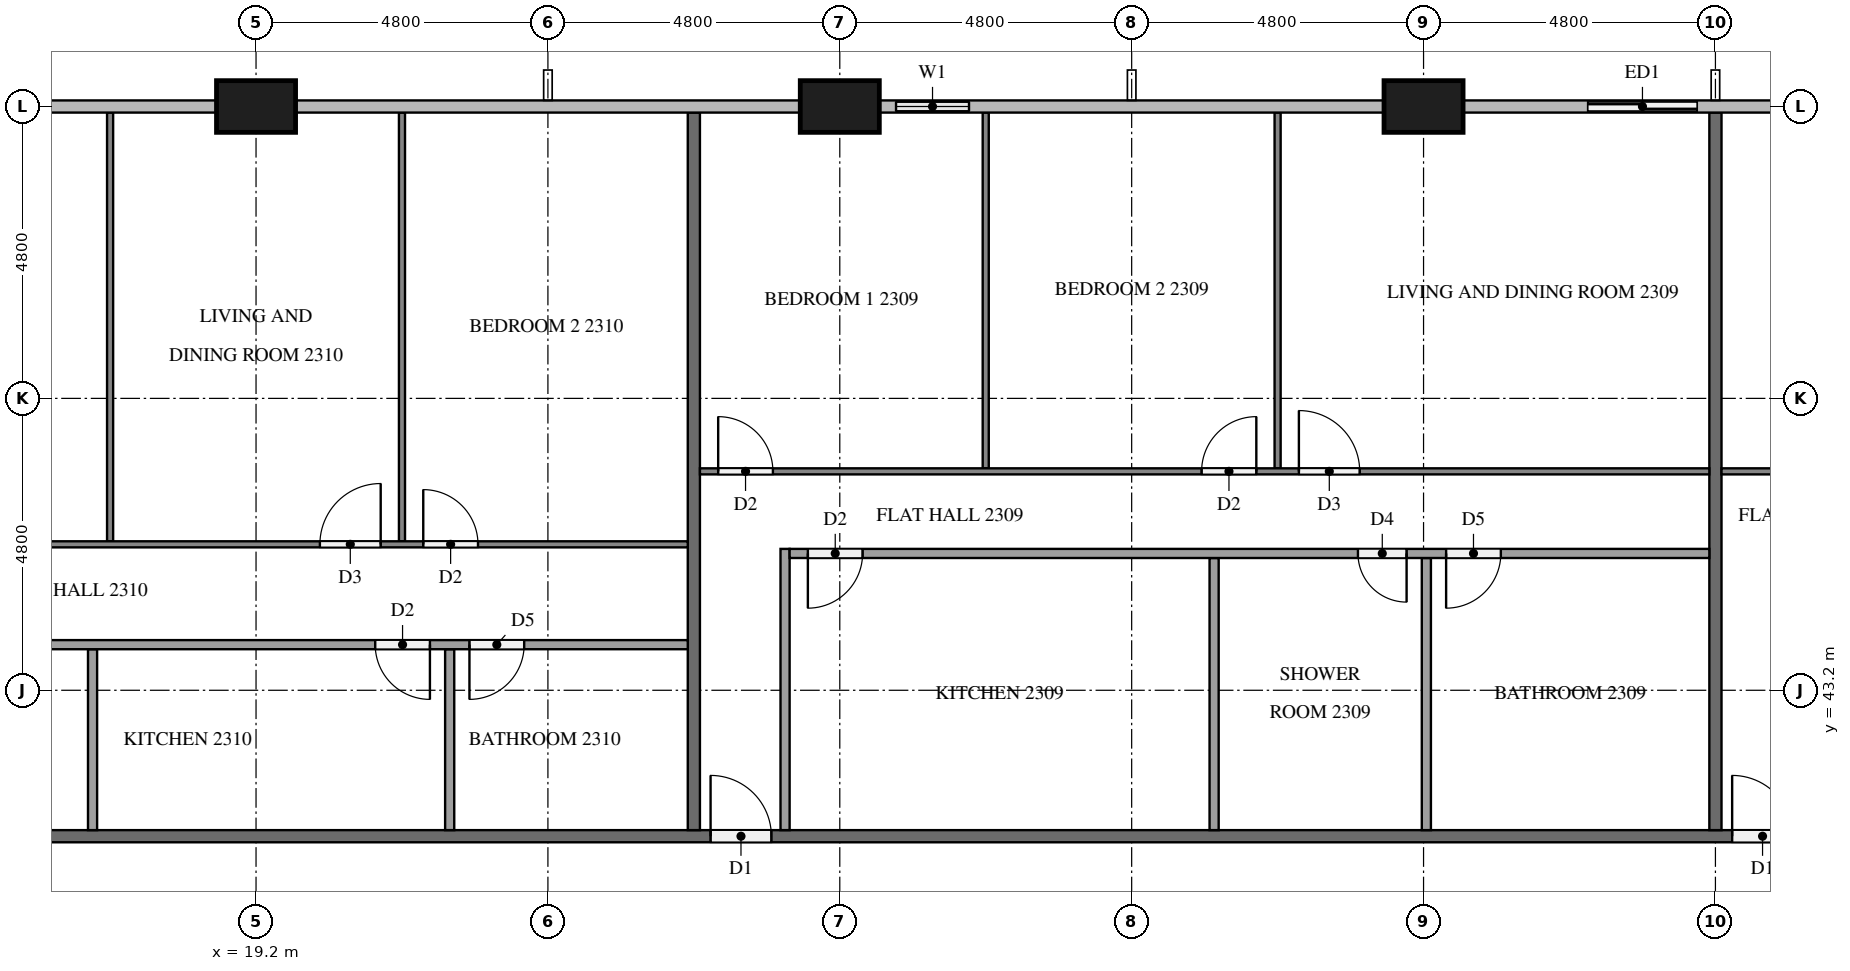
"""IFC4 building model, lengths in metres.
Left out: names, types, materials, properties, quantities, classifications, styles, units other than length and angle.
Written with IfcOpenShell. Run it as: python <this file> out.ifc"""

import sys

from ifc_helpers import new_model, si_unit, direction, frame, frame_2d, origin, origin_2d, place, context, subcontext, project, spatial, rectangle, extrude, element, fill, save


model = new_model("IFC4")
c1 = context("Model", 3, precision=1e-05, world=origin(), true_north=direction((0.0, 1.0)))
c2 = subcontext(c1, "Body", "Model", "MODEL_VIEW")
j1 = project(units=[si_unit("LENGTHUNIT", "METRE"), si_unit("PLANEANGLEUNIT", "RADIAN")], contexts=[c1])
p1 = place(None, origin())
s1 = spatial("IfcSite", under=j1, at=p1, CompositionType="ELEMENT")
p2 = place(p1, origin())
s2 = spatial("IfcBuilding", under=s1, at=p2, CompositionType="ELEMENT")
p3 = place(p2, frame((0.0, 0.0, 92.7)))
s3 = spatial("IfcBuildingStorey", under=s2, at=p3, CompositionType="ELEMENT", Elevation=92.7)
for number, where, z_axis, x_axis in (
    (1, (38.4, 52.8, 0.0), (0.0, 0.0, 1.0), (1.0, 0.0, 0.0)),
    (2, (28.8, 52.8, 0.0), (0.0, 0.0, 1.0), (1.0, 0.0, 0.0)),
    (3, (19.2, 52.8, 0.0), (0.0, 0.0, 1.0), (1.0, 0.0, 0.0)),
):
    element("IfcColumn", number, at=place(p3, frame(where, z_axis=z_axis, x_axis=x_axis)), inside=s3, PredefinedType="COLUMN", context=c2, shape_type="SweptSolid", body=[
        extrude(rectangle(XDim=1.3, YDim=0.85, at=origin_2d()), origin(), (0.0, 0.0, 1.0), 3.2),
    ])
p4 = place(p3, frame((43.2, 52.8, 0.0), z_axis=(0.0, 0.0, 1.0), x_axis=(-1.0, 0.0, 0.0)))
e4 = element("IfcWall", 4, at=p4, inside=s3, PredefinedType="SOLIDWALL", context=c2, shape_type="SweptSolid", body=[
    extrude(rectangle(XDim=2.4, YDim=0.15, at=frame_2d((1.2, 0.0))), origin(), (0.0, 0.0, 1.0), 3.2),
])
p5 = place(p4, frame((0.3, 0.0, 0.0)))
e5 = element("IfcOpeningElement", 5, at=p5, cuts=e4, PredefinedType="OPENING", context=c2, shape_type="SweptSolid", body=[
    extrude(rectangle(XDim=1.8, YDim=2.4, at=frame_2d((0.9, 1.2))), frame((0.0, 0.085, 0.0), z_axis=(0.0, -1.0, 0.0), x_axis=(1.0, 0.0, 0.0)), (0.0, 0.0, 1.0), 0.17),
])
p6 = place(p3, frame((31.2, 52.8, 0.0), z_axis=(0.0, 0.0, 1.0), x_axis=(-1.0, 0.0, 0.0)))
e6 = element("IfcWall", 6, at=p6, inside=s3, PredefinedType="SOLIDWALL", context=c2, shape_type="SweptSolid", body=[
    extrude(rectangle(XDim=1.75, YDim=0.15, at=frame_2d((0.875, 0.0))), origin(), (0.0, 0.0, 1.0), 3.2),
])
p7 = place(p6, frame((0.275, 0.0, 0.9)))
e7 = element("IfcOpeningElement", 7, at=p7, cuts=e6, PredefinedType="OPENING", context=c2, shape_type="SweptSolid", body=[
    extrude(rectangle(XDim=1.2, YDim=1.4, at=frame_2d((0.6, 0.7))), frame((0.0, 0.085, 0.0), z_axis=(0.0, -1.0, 0.0), x_axis=(1.0, 0.0, 0.0)), (0.0, 0.0, 1.0), 0.17),
])
p8 = place(p3, frame((11.9, 40.8, 0.0), z_axis=(0.0, 0.0, 1.0), x_axis=(1.0, 0.0, 0.0)))
e8 = element("IfcWall", 8, at=p8, inside=s3, PredefinedType="PARTITIONING", context=c2, shape_type="SweptSolid", body=[
    extrude(rectangle(XDim=38.6, YDim=0.2, at=frame_2d((19.3, 0.0))), origin(), (0.0, 0.0, 1.0), 3.2),
])
p9 = place(p8, frame((31.575, 0.0, 0.0)))
e9 = element("IfcOpeningElement", 9, at=p9, cuts=e8, PredefinedType="OPENING", context=c2, shape_type="SweptSolid", body=[
    extrude(rectangle(XDim=1.0, YDim=2.1, at=frame_2d((0.5, 1.05))), frame((0.0, 0.11, 0.0), z_axis=(0.0, -1.0, 0.0), x_axis=(1.0, 0.0, 0.0)), (0.0, 0.0, 1.0), 0.22),
])
p10 = place(p8, frame((14.775, 0.0, 0.0)))
e10 = element("IfcOpeningElement", 10, at=p10, cuts=e8, PredefinedType="OPENING", context=c2, shape_type="SweptSolid", body=[
    extrude(rectangle(XDim=1.0, YDim=2.1, at=frame_2d((0.5, 1.05))), frame((0.0, 0.11, 0.0), z_axis=(0.0, -1.0, 0.0), x_axis=(1.0, 0.0, 0.0)), (0.0, 0.0, 1.0), 0.22),
])
p11 = place(p8, frame((0.375, 0.0, 0.0)))
e11 = element("IfcOpeningElement", 11, at=p11, cuts=e8, PredefinedType="OPENING", context=c2, shape_type="SweptSolid", body=[
    extrude(rectangle(XDim=1.0, YDim=2.1, at=frame_2d((0.5, 1.05))), frame((0.0, 0.11, 0.0), z_axis=(0.0, -1.0, 0.0), x_axis=(1.0, 0.0, 0.0)), (0.0, 0.0, 1.0), 0.22),
])
for number, where, z_axis, x_axis in (
    (12, (43.2, 52.7, 0.0), (0.0, 0.0, 1.0), (0.0, -1.0, 0.0)),
    (13, (26.4, 52.7, 0.0), (0.0, 0.0, 1.0), (0.0, -1.0, 0.0)),
):
    element("IfcWall", number, at=place(p3, frame(where, z_axis=z_axis, x_axis=x_axis)), inside=s3, PredefinedType="PARTITIONING", context=c2, shape_type="SweptSolid", body=[
        extrude(rectangle(XDim=11.8, YDim=0.2, at=frame_2d((5.9, 0.0))), origin(), (0.0, 0.0, 1.0), 3.2),
    ])
p12 = place(p3, frame((43.3, 46.8, 0.0), z_axis=(0.0, 0.0, 1.0), x_axis=(1.0, 0.0, 0.0)))
e14 = element("IfcWall", 14, at=p12, inside=s3, PredefinedType="PARTITIONING", context=c2, shape_type="SweptSolid", body=[
    extrude(rectangle(XDim=7.0, YDim=0.1, at=frame_2d((3.5, 0.0))), origin(), (0.0, 0.0, 1.0), 3.2),
])
p13 = place(p12, frame((5.7, 0.0, 0.0)))
e15 = element("IfcOpeningElement", 15, at=p13, cuts=e14, PredefinedType="OPENING", context=c2, shape_type="SweptSolid", body=[
    extrude(rectangle(XDim=1.0, YDim=2.1, at=frame_2d((0.5, 1.05))), frame((0.0, 0.06, 0.0), z_axis=(0.0, -1.0, 0.0), x_axis=(1.0, 0.0, 0.0)), (0.0, 0.0, 1.0), 0.12),
])
for number, where, z_axis, x_axis in (
    (16, (31.2, 46.85, 0.0), (0.0, 0.0, 1.0), (0.0, 1.0, 0.0)),
    (17, (36.0, 46.85, 0.0), (0.0, 0.0, 1.0), (0.0, 1.0, 0.0)),
):
    element("IfcWall", number, at=place(p3, frame(where, z_axis=z_axis, x_axis=x_axis)), inside=s3, PredefinedType="PARTITIONING", context=c2, shape_type="SweptSolid", body=[
        extrude(rectangle(XDim=5.85, YDim=0.1, at=frame_2d((2.925, 0.0))), origin(), (0.0, 0.0, 1.0), 3.2),
    ])
p14 = place(p3, frame((26.5, 46.8, 0.0), z_axis=(0.0, 0.0, 1.0), x_axis=(1.0, 0.0, 0.0)))
e18 = element("IfcWall", 18, at=p14, inside=s3, PredefinedType="PARTITIONING", context=c2, shape_type="SweptSolid", body=[
    extrude(rectangle(XDim=16.6, YDim=0.1, at=frame_2d((8.3, 0.0))), origin(), (0.0, 0.0, 1.0), 3.2),
])
p15 = place(p14, frame((0.3, 0.0, 0.0)))
e19 = element("IfcOpeningElement", 19, at=p15, cuts=e18, PredefinedType="OPENING", context=c2, shape_type="SweptSolid", body=[
    extrude(rectangle(XDim=0.9, YDim=2.1, at=frame_2d((0.45, 1.05))), frame((0.0, 0.06, 0.0), z_axis=(0.0, -1.0, 0.0), x_axis=(1.0, 0.0, 0.0)), (0.0, 0.0, 1.0), 0.12),
])
p16 = place(p14, frame((8.25, 0.0, 0.0)))
e20 = element("IfcOpeningElement", 20, at=p16, cuts=e18, PredefinedType="OPENING", context=c2, shape_type="SweptSolid", body=[
    extrude(rectangle(XDim=0.9, YDim=2.1, at=frame_2d((0.45, 1.05))), frame((0.0, 0.06, 0.0), z_axis=(0.0, -1.0, 0.0), x_axis=(1.0, 0.0, 0.0)), (0.0, 0.0, 1.0), 0.12),
])
p17 = place(p14, frame((9.85, 0.0, 0.0)))
e21 = element("IfcOpeningElement", 21, at=p17, cuts=e18, PredefinedType="OPENING", context=c2, shape_type="SweptSolid", body=[
    extrude(rectangle(XDim=1.0, YDim=2.1, at=frame_2d((0.5, 1.05))), frame((0.0, 0.06, 0.0), z_axis=(0.0, -1.0, 0.0), x_axis=(1.0, 0.0, 0.0)), (0.0, 0.0, 1.0), 0.12),
])
for number, where, z_axis, x_axis in (
    (22, (34.956, 40.9, 0.0), (0.0, 0.0, 1.0), (0.0, 1.0, 0.0)),
    (23, (38.446, 40.9, 0.0), (0.0, 0.0, 1.0), (0.0, 1.0, 0.0)),
):
    element("IfcWall", number, at=place(p3, frame(where, z_axis=z_axis, x_axis=x_axis)), inside=s3, PredefinedType="PARTITIONING", context=c2, shape_type="SweptSolid", body=[
        extrude(rectangle(XDim=4.475, YDim=0.15, at=frame_2d((2.238, 0.0))), origin(), (0.0, 0.0, 1.0), 3.2),
    ])
p18 = place(p3, frame((27.9, 40.9, 0.0), z_axis=(0.0, 0.0, 1.0), x_axis=(0.0, 1.0, 0.0)))
e24 = element("IfcWall", 24, at=p18, inside=s3, PredefinedType="PARTITIONING", context=c2, shape_type="SweptSolid", body=[
    extrude(rectangle(XDim=4.625, YDim=0.15, at=frame_2d((2.312, 0.0))), origin(), (0.0, 0.0, 1.0), 3.2),
])
p19 = place(p3, frame((43.1, 45.45, 0.0), z_axis=(0.0, 0.0, 1.0), x_axis=(-1.0, 0.0, 0.0)))
e25 = element("IfcWall", 25, at=p19, inside=s3, PredefinedType="PARTITIONING", context=c2, shape_type="SweptSolid", body=[
    extrude(rectangle(XDim=15.125, YDim=0.15, at=frame_2d((7.562, 0.0))), origin(), (0.0, 0.0, 1.0), 3.2),
])
p20 = place(p19, frame((13.925, 0.0, 0.0)))
e26 = element("IfcOpeningElement", 26, at=p20, cuts=e25, PredefinedType="OPENING", context=c2, shape_type="SweptSolid", body=[
    extrude(rectangle(XDim=0.9, YDim=2.1, at=frame_2d((0.45, 1.05))), frame((0.0, 0.085, 0.0), z_axis=(0.0, -1.0, 0.0), x_axis=(1.0, 0.0, 0.0)), (0.0, 0.0, 1.0), 0.17),
])
p21 = place(p19, frame((4.979, 0.0, 0.0)))
e27 = element("IfcOpeningElement", 27, at=p21, cuts=e25, PredefinedType="OPENING", context=c2, shape_type="SweptSolid", body=[
    extrude(rectangle(XDim=0.8, YDim=2.1, at=frame_2d((0.4, 1.05))), frame((0.0, 0.085, 0.0), z_axis=(0.0, -1.0, 0.0), x_axis=(1.0, 0.0, 0.0)), (0.0, 0.0, 1.0), 0.17),
])
p22 = place(p19, frame((3.429, 0.0, 0.0)))
e28 = element("IfcOpeningElement", 28, at=p22, cuts=e25, PredefinedType="OPENING", context=c2, shape_type="SweptSolid", body=[
    extrude(rectangle(XDim=0.9, YDim=2.1, at=frame_2d((0.45, 1.05))), frame((0.0, 0.085, 0.0), z_axis=(0.0, -1.0, 0.0), x_axis=(1.0, 0.0, 0.0)), (0.0, 0.0, 1.0), 0.17),
])
for number, where, z_axis, x_axis in (
    (29, (16.8, 45.65, 0.0), (0.0, 0.0, 1.0), (0.0, 1.0, 0.0)),
    (30, (21.6, 45.65, 0.0), (0.0, 0.0, 1.0), (0.0, 1.0, 0.0)),
):
    element("IfcWall", number, at=place(p3, frame(where, z_axis=z_axis, x_axis=x_axis)), inside=s3, PredefinedType="PARTITIONING", context=c2, shape_type="SweptSolid", body=[
        extrude(rectangle(XDim=7.05, YDim=0.1, at=frame_2d((3.525, 0.0))), origin(), (0.0, 0.0, 1.0), 3.2),
    ])
p23 = place(p3, frame((12.1, 45.6, 0.0), z_axis=(0.0, 0.0, 1.0), x_axis=(1.0, 0.0, 0.0)))
e31 = element("IfcWall", 31, at=p23, inside=s3, PredefinedType="PARTITIONING", context=c2, shape_type="SweptSolid", body=[
    extrude(rectangle(XDim=14.2, YDim=0.1, at=frame_2d((7.1, 0.0))), origin(), (0.0, 0.0, 1.0), 3.2),
])
p24 = place(p23, frame((0.3, 0.0, 0.0)))
e32 = element("IfcOpeningElement", 32, at=p24, cuts=e31, PredefinedType="OPENING", context=c2, shape_type="SweptSolid", body=[
    extrude(rectangle(XDim=0.9, YDim=2.1, at=frame_2d((0.45, 1.05))), frame((0.0, 0.06, 0.0), z_axis=(0.0, -1.0, 0.0), x_axis=(1.0, 0.0, 0.0)), (0.0, 0.0, 1.0), 0.12),
])
p25 = place(p23, frame((8.15, 0.0, 0.0)))
e33 = element("IfcOpeningElement", 33, at=p25, cuts=e31, PredefinedType="OPENING", context=c2, shape_type="SweptSolid", body=[
    extrude(rectangle(XDim=1.0, YDim=2.1, at=frame_2d((0.5, 1.05))), frame((0.0, 0.06, 0.0), z_axis=(0.0, -1.0, 0.0), x_axis=(1.0, 0.0, 0.0)), (0.0, 0.0, 1.0), 0.12),
])
p26 = place(p23, frame((9.85, 0.0, 0.0)))
e34 = element("IfcOpeningElement", 34, at=p26, cuts=e31, PredefinedType="OPENING", context=c2, shape_type="SweptSolid", body=[
    extrude(rectangle(XDim=0.9, YDim=2.1, at=frame_2d((0.45, 1.05))), frame((0.0, 0.06, 0.0), z_axis=(0.0, -1.0, 0.0), x_axis=(1.0, 0.0, 0.0)), (0.0, 0.0, 1.0), 0.12),
])
for number, where, z_axis, x_axis in (
    (35, (16.511, 40.9, 0.0), (0.0, 0.0, 1.0), (0.0, 1.0, 0.0)),
    (36, (22.385, 40.9, 0.0), (0.0, 0.0, 1.0), (0.0, 1.0, 0.0)),
):
    element("IfcWall", number, at=place(p3, frame(where, z_axis=z_axis, x_axis=x_axis)), inside=s3, PredefinedType="PARTITIONING", context=c2, shape_type="SweptSolid", body=[
        extrude(rectangle(XDim=2.975, YDim=0.15, at=frame_2d((1.488, 0.0))), origin(), (0.0, 0.0, 1.0), 3.2),
    ])
p27 = place(p3, frame((26.3, 43.95, 0.0), z_axis=(0.0, 0.0, 1.0), x_axis=(-1.0, 0.0, 0.0)))
e37 = element("IfcWall", 37, at=p27, inside=s3, PredefinedType="PARTITIONING", context=c2, shape_type="SweptSolid", body=[
    extrude(rectangle(XDim=12.725, YDim=0.15, at=frame_2d((6.363, 0.0))), origin(), (0.0, 0.0, 1.0), 3.2),
])
p28 = place(p27, frame((11.625, 0.0, 0.0)))
e38 = element("IfcOpeningElement", 38, at=p28, cuts=e37, PredefinedType="OPENING", context=c2, shape_type="SweptSolid", body=[
    extrude(rectangle(XDim=0.8, YDim=2.1, at=frame_2d((0.4, 1.05))), frame((0.0, 0.085, 0.0), z_axis=(0.0, -1.0, 0.0), x_axis=(1.0, 0.0, 0.0)), (0.0, 0.0, 1.0), 0.17),
])
p29 = place(p27, frame((4.24, 0.0, 0.0)))
e39 = element("IfcOpeningElement", 39, at=p29, cuts=e37, PredefinedType="OPENING", context=c2, shape_type="SweptSolid", body=[
    extrude(rectangle(XDim=0.9, YDim=2.1, at=frame_2d((0.45, 1.05))), frame((0.0, 0.085, 0.0), z_axis=(0.0, -1.0, 0.0), x_axis=(1.0, 0.0, 0.0)), (0.0, 0.0, 1.0), 0.17),
])
p30 = place(p27, frame((2.69, 0.0, 0.0)))
e40 = element("IfcOpeningElement", 40, at=p30, cuts=e37, PredefinedType="OPENING", context=c2, shape_type="SweptSolid", body=[
    extrude(rectangle(XDim=0.9, YDim=2.1, at=frame_2d((0.45, 1.05))), frame((0.0, 0.085, 0.0), z_axis=(0.0, -1.0, 0.0), x_axis=(1.0, 0.0, 0.0)), (0.0, 0.0, 1.0), 0.17),
])
p31 = place(p5, origin())
e41 = element("IfcDoor", 41, at=p31, inside=s3, OperationType="SLIDING_TO_RIGHT", PredefinedType="DOOR", context=c2, shape_type="SweptSolid", body=[
    extrude(rectangle(XDim=1.8, YDim=2.4, at=frame_2d((0.9, 1.2))), frame((0.0, 0.025, 0.0), z_axis=(0.0, -1.0, 0.0), x_axis=(1.0, 0.0, 0.0)), (0.0, 0.0, 1.0), 0.05),
])
fill(e5, e41)
p32 = place(p7, origin())
e42 = element("IfcWindow", 42, at=p32, inside=s3, PartitioningType="SINGLE_PANEL", PredefinedType="WINDOW", context=c2, shape_type="SweptSolid", body=[
    extrude(rectangle(XDim=1.2, YDim=1.4, at=frame_2d((0.6, 0.7))), frame((0.0, 0.03, 0.0), z_axis=(0.0, -1.0, 0.0), x_axis=(1.0, 0.0, 0.0)), (0.0, 0.0, 1.0), 0.06),
])
fill(e7, e42)
p33 = place(p9, origin())
e43 = element("IfcDoor", 43, at=p33, inside=s3, OperationType="SINGLE_SWING_LEFT", PredefinedType="DOOR", context=c2, shape_type="SweptSolid", body=[
    extrude(rectangle(XDim=1.0, YDim=2.1, at=frame_2d((0.5, 1.05))), frame((0.0, 0.025, 0.0), z_axis=(0.0, -1.0, 0.0), x_axis=(1.0, 0.0, 0.0)), (0.0, 0.0, 1.0), 0.05),
])
fill(e9, e43)
p34 = place(p10, origin())
e44 = element("IfcDoor", 44, at=p34, inside=s3, OperationType="SINGLE_SWING_LEFT", PredefinedType="DOOR", context=c2, shape_type="SweptSolid", body=[
    extrude(rectangle(XDim=1.0, YDim=2.1, at=frame_2d((0.5, 1.05))), frame((0.0, 0.025, 0.0), z_axis=(0.0, -1.0, 0.0), x_axis=(1.0, 0.0, 0.0)), (0.0, 0.0, 1.0), 0.05),
])
fill(e10, e44)
p35 = place(p15, origin())
e45 = element("IfcDoor", 45, at=p35, inside=s3, OperationType="SINGLE_SWING_LEFT", PredefinedType="DOOR", context=c2, shape_type="SweptSolid", body=[
    extrude(rectangle(XDim=0.9, YDim=2.1, at=frame_2d((0.45, 1.05))), frame((0.0, 0.025, 0.0), z_axis=(0.0, -1.0, 0.0), x_axis=(1.0, 0.0, 0.0)), (0.0, 0.0, 1.0), 0.05),
])
fill(e19, e45)
p36 = place(p16, origin())
e46 = element("IfcDoor", 46, at=p36, inside=s3, OperationType="SINGLE_SWING_RIGHT", PredefinedType="DOOR", context=c2, shape_type="SweptSolid", body=[
    extrude(rectangle(XDim=0.9, YDim=2.1, at=frame_2d((0.45, 1.05))), frame((0.0, 0.025, 0.0), z_axis=(0.0, -1.0, 0.0), x_axis=(1.0, 0.0, 0.0)), (0.0, 0.0, 1.0), 0.05),
])
fill(e20, e46)
p37 = place(p17, origin())
e47 = element("IfcDoor", 47, at=p37, inside=s3, OperationType="SINGLE_SWING_LEFT", PredefinedType="DOOR", context=c2, shape_type="SweptSolid", body=[
    extrude(rectangle(XDim=1.0, YDim=2.1, at=frame_2d((0.5, 1.05))), frame((0.0, 0.025, 0.0), z_axis=(0.0, -1.0, 0.0), x_axis=(1.0, 0.0, 0.0)), (0.0, 0.0, 1.0), 0.05),
])
fill(e21, e47)
p38 = place(p20, origin())
e48 = element("IfcDoor", 48, at=p38, inside=s3, OperationType="SINGLE_SWING_RIGHT", PredefinedType="DOOR", context=c2, shape_type="SweptSolid", body=[
    extrude(rectangle(XDim=0.9, YDim=2.1, at=frame_2d((0.45, 1.05))), frame((0.0, 0.025, 0.0), z_axis=(0.0, -1.0, 0.0), x_axis=(1.0, 0.0, 0.0)), (0.0, 0.0, 1.0), 0.05),
])
fill(e26, e48)
p39 = place(p21, origin())
e49 = element("IfcDoor", 49, at=p39, inside=s3, OperationType="SINGLE_SWING_LEFT", PredefinedType="DOOR", context=c2, shape_type="SweptSolid", body=[
    extrude(rectangle(XDim=0.8, YDim=2.1, at=frame_2d((0.4, 1.05))), frame((0.0, 0.025, 0.0), z_axis=(0.0, -1.0, 0.0), x_axis=(1.0, 0.0, 0.0)), (0.0, 0.0, 1.0), 0.05),
])
fill(e27, e49)
p40 = place(p22, origin())
e50 = element("IfcDoor", 50, at=p40, inside=s3, OperationType="SINGLE_SWING_RIGHT", PredefinedType="DOOR", context=c2, shape_type="SweptSolid", body=[
    extrude(rectangle(XDim=0.9, YDim=2.1, at=frame_2d((0.45, 1.05))), frame((0.0, 0.025, 0.0), z_axis=(0.0, -1.0, 0.0), x_axis=(1.0, 0.0, 0.0)), (0.0, 0.0, 1.0), 0.05),
])
fill(e28, e50)
p41 = place(p25, origin())
e51 = element("IfcDoor", 51, at=p41, inside=s3, OperationType="SINGLE_SWING_RIGHT", PredefinedType="DOOR", context=c2, shape_type="SweptSolid", body=[
    extrude(rectangle(XDim=1.0, YDim=2.1, at=frame_2d((0.5, 1.05))), frame((0.0, 0.025, 0.0), z_axis=(0.0, -1.0, 0.0), x_axis=(1.0, 0.0, 0.0)), (0.0, 0.0, 1.0), 0.05),
])
fill(e33, e51)
p42 = place(p26, origin())
e52 = element("IfcDoor", 52, at=p42, inside=s3, OperationType="SINGLE_SWING_LEFT", PredefinedType="DOOR", context=c2, shape_type="SweptSolid", body=[
    extrude(rectangle(XDim=0.9, YDim=2.1, at=frame_2d((0.45, 1.05))), frame((0.0, 0.025, 0.0), z_axis=(0.0, -1.0, 0.0), x_axis=(1.0, 0.0, 0.0)), (0.0, 0.0, 1.0), 0.05),
])
fill(e34, e52)
p43 = place(p29, origin())
e53 = element("IfcDoor", 53, at=p43, inside=s3, OperationType="SINGLE_SWING_LEFT", PredefinedType="DOOR", context=c2, shape_type="SweptSolid", body=[
    extrude(rectangle(XDim=0.9, YDim=2.1, at=frame_2d((0.45, 1.05))), frame((0.0, 0.025, 0.0), z_axis=(0.0, -1.0, 0.0), x_axis=(1.0, 0.0, 0.0)), (0.0, 0.0, 1.0), 0.05),
])
fill(e39, e53)
p44 = place(p30, origin())
e54 = element("IfcDoor", 54, at=p44, inside=s3, OperationType="SINGLE_SWING_RIGHT", PredefinedType="DOOR", context=c2, shape_type="SweptSolid", body=[
    extrude(rectangle(XDim=0.9, YDim=2.1, at=frame_2d((0.45, 1.05))), frame((0.0, 0.025, 0.0), z_axis=(0.0, -1.0, 0.0), x_axis=(1.0, 0.0, 0.0)), (0.0, 0.0, 1.0), 0.05),
])
fill(e40, e54)
save(model, sys.argv[1])
